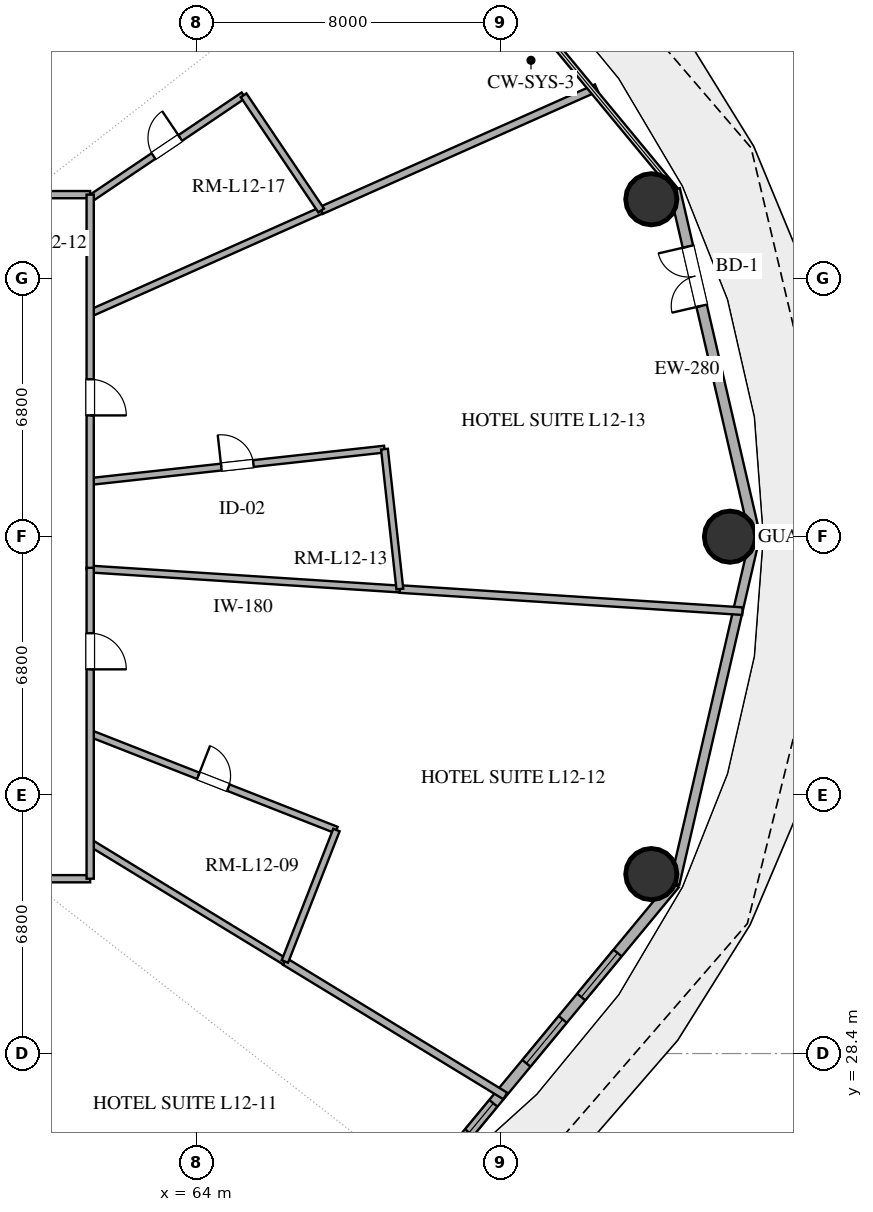
"""IFC4 building model, lengths in metres.
Left out: names, types, materials, properties, quantities, classifications, styles, units other than length and angle.
Written with IfcOpenShell. Run it as: python <this file> out.ifc"""

import sys

from ifc_helpers import new_model, si_unit, direction, frame, frame_2d, origin, origin_2d, place, context, subcontext, project, spatial, rectangle, hollow_circle, extrude, element, fill, save


model = new_model("IFC4")
c1 = context("Model", 3, precision=1e-05, world=origin(), true_north=direction((0.0, 1.0)))
c2 = subcontext(c1, "Body", "Model", "MODEL_VIEW")
j1 = project(units=[si_unit("LENGTHUNIT", "METRE"), si_unit("PLANEANGLEUNIT", "RADIAN")], contexts=[c1])
p1 = place(None, origin())
s1 = spatial("IfcSite", under=j1, at=p1, CompositionType="ELEMENT")
p2 = place(p1, origin())
s2 = spatial("IfcBuilding", under=s1, at=p2, CompositionType="ELEMENT")
p3 = place(p2, frame((0.0, 0.0, 53.4)))
s3 = spatial("IfcBuildingStorey", under=s2, at=p3, CompositionType="ELEMENT", Elevation=53.4)
for number, where, z_axis, x_axis in (
    (1, (78.035, 42.0, 0.0), (0.0, 0.0, 1.0), (1.0, 0.0, 0.0)),
    (2, (75.966, 50.878, 0.0), (0.0, 0.0, 1.0), (1.0, 0.0, 0.0)),
    (3, (75.966, 33.122, 0.0), (0.0, 0.0, 1.0), (1.0, 0.0, 0.0)),
):
    element("IfcColumn", number, at=place(p3, frame(where, z_axis=z_axis, x_axis=x_axis)), inside=s3, PredefinedType="COLUMN", context=c2, shape_type="SweptSolid", body=[
        extrude(hollow_circle(Radius=0.675, WallThickness=0.036, at=origin_2d()), origin(), (0.0, 0.0, 1.0), 3.38),
    ])
p4 = place(p3, frame((78.696, 42.0, 0.0), z_axis=(0.0, 0.0, 1.0), x_axis=(-0.225454452941, 0.974253709076, 0.0)))
e4 = element("IfcWall", 4, at=p4, inside=s3, PredefinedType="SOLIDWALL", context=c2, shape_type="SweptSolid", body=[
    extrude(rectangle(XDim=9.38, YDim=0.28, at=frame_2d((4.69, 0.0))), origin(), (0.0, 0.0, 1.0), 3.38),
])
p5 = place(p4, frame((6.235, 0.0, 0.0)))
e5 = element("IfcOpeningElement", 5, at=p5, cuts=e4, PredefinedType="OPENING", context=c2, shape_type="SweptSolid", body=[
    extrude(rectangle(XDim=1.6, YDim=2.25, at=frame_2d((0.8, 1.125))), frame((0.0, 0.15, 0.0), z_axis=(0.0, -1.0, 0.0), x_axis=(1.0, 0.0, 0.0)), (0.0, 0.0, 1.0), 0.3),
])
p6 = place(p3, frame((70.174, 25.114, 0.0), z_axis=(0.0, 0.0, 1.0), x_axis=(0.637296809613, 0.770618437657, 0.0)))
e6 = element("IfcWall", 6, at=p6, inside=s3, PredefinedType="SOLIDWALL", context=c2, shape_type="SweptSolid", body=[
    extrude(rectangle(XDim=10.053, YDim=0.28, at=frame_2d((5.027, 0.0))), origin(), (0.0, 0.0, 1.0), 3.38),
])
p7 = place(p6, frame((1.565, 0.0, 0.85)))
e7 = element("IfcOpeningElement", 7, at=p7, cuts=e6, PredefinedType="OPENING", context=c2, shape_type="SweptSolid", body=[
    extrude(rectangle(XDim=1.0, YDim=1.8, at=frame_2d((0.5, 0.9))), frame((0.0, 0.15, 0.0), z_axis=(0.0, -1.0, 0.0), x_axis=(1.0, 0.0, 0.0)), (0.0, 0.0, 1.0), 0.3),
])
p8 = place(p6, frame((3.93, 0.0, 0.85)))
e8 = element("IfcOpeningElement", 8, at=p8, cuts=e6, PredefinedType="OPENING", context=c2, shape_type="SweptSolid", body=[
    extrude(rectangle(XDim=1.5, YDim=1.8, at=frame_2d((0.75, 0.9))), frame((0.0, 0.15, 0.0), z_axis=(0.0, -1.0, 0.0), x_axis=(1.0, 0.0, 0.0)), (0.0, 0.0, 1.0), 0.3),
])
p9 = place(p6, frame((6.196, 0.0, 0.85)))
e9 = element("IfcOpeningElement", 9, at=p9, cuts=e6, PredefinedType="OPENING", context=c2, shape_type="SweptSolid", body=[
    extrude(rectangle(XDim=1.5, YDim=1.8, at=frame_2d((0.75, 0.9))), frame((0.0, 0.15, 0.0), z_axis=(0.0, -1.0, 0.0), x_axis=(1.0, 0.0, 0.0)), (0.0, 0.0, 1.0), 0.3),
])
p10 = place(p3, frame((76.581, 32.862, 0.0), z_axis=(0.0, 0.0, 1.0), x_axis=(0.225454452941, 0.974253709076, 0.0)))
e10 = element("IfcWall", 10, at=p10, inside=s3, PredefinedType="SOLIDWALL", context=c2, shape_type="SweptSolid", body=[
    extrude(rectangle(XDim=9.38, YDim=0.25, at=frame_2d((4.69, 0.0))), origin(), (0.0, 0.0, 1.0), 3.38),
])
p11 = place(p3, frame((63.96, 62.204, 0.0), z_axis=(0.0, 0.0, 1.0), x_axis=(-0.619889304847, -0.784689269543, 0.0)))
e11 = element("IfcWall", 11, at=p11, inside=s3, PredefinedType="PARTITIONING", context=c2, shape_type="SweptSolid", body=[
    extrude(rectangle(XDim=14.278, YDim=0.2, at=frame_2d((7.139, 0.0))), origin(), (0.0, 0.0, 1.0), 2.74),
])
p12 = place(p3, frame((78.364, 40.041, 0.0), z_axis=(0.0, 0.0, 1.0), x_axis=(-0.997924020497, 0.064402246198, 0.0)))
e12 = element("IfcWall", 12, at=p12, inside=s3, PredefinedType="PARTITIONING", context=c2, shape_type="SweptSolid", body=[
    extrude(rectangle(XDim=9.034, YDim=0.2, at=frame_2d((4.517, 0.0))), origin(), (0.0, 0.0, 1.0), 2.74),
])
p13 = place(p3, frame((69.349, 40.622, 0.0), z_axis=(0.0, 0.0, 1.0), x_axis=(-0.997924317455, 0.064397644621, 0.0)))
e13 = element("IfcWall", 13, at=p13, inside=s3, PredefinedType="PLUMBINGWALL", context=c2, shape_type="SweptSolid", body=[
    extrude(rectangle(XDim=8.166, YDim=0.18, at=frame_2d((4.083, 0.0))), origin(), (0.0, 0.0, 1.0), 2.74),
])
p14 = place(p3, frame((74.523, 53.809, 0.0), z_axis=(0.0, 0.0, 1.0), x_axis=(-0.913542208968, -0.40674393964, 0.0)))
e14 = element("IfcWall", 14, at=p14, inside=s3, PredefinedType="PARTITIONING", context=c2, shape_type="SweptSolid", body=[
    extrude(rectangle(XDim=7.93, YDim=0.2, at=frame_2d((3.965, 0.0))), origin(), (0.0, 0.0, 1.0), 2.74),
])
p15 = place(p3, frame((61.2, 43.452, 0.0), z_axis=(0.0, 0.0, 1.0), x_axis=(0.994005037085, 0.109334286708, 0.0)))
e15 = element("IfcWall", 15, at=p15, inside=s3, PredefinedType="PLUMBINGWALL", context=c2, shape_type="SweptSolid", body=[
    extrude(rectangle(XDim=7.791, YDim=0.18, at=frame_2d((3.896, 0.0))), origin(), (0.0, 0.0, 1.0), 2.74),
])
p16 = place(p15, frame((3.47, 0.0, 0.0)))
e16 = element("IfcOpeningElement", 16, at=p16, cuts=e15, PredefinedType="OPENING", context=c2, shape_type="SweptSolid", body=[
    extrude(rectangle(XDim=0.85, YDim=2.1, at=frame_2d((0.425, 1.05))), frame((0.0, 0.1, 0.0), z_axis=(0.0, -1.0, 0.0), x_axis=(1.0, 0.0, 0.0)), (0.0, 0.0, 1.0), 0.2),
])
p17 = place(p3, frame((61.01, 20.281, 0.0), z_axis=(0.0, 0.0, 1.0), x_axis=(-0.513892719639, 0.857854458928, 0.0)))
e17 = element("IfcWall", 17, at=p17, inside=s3, PredefinedType="PARTITIONING", context=c2, shape_type="SweptSolid", body=[
    extrude(rectangle(XDim=7.563, YDim=0.2, at=frame_2d((3.781, 0.0))), origin(), (0.0, 0.0, 1.0), 2.74),
])
p18 = place(p3, frame((61.2, 36.823, 0.0), z_axis=(0.0, 0.0, 1.0), x_axis=(0.930954264603, -0.365135806539, 0.0)))
e18 = element("IfcWall", 18, at=p18, inside=s3, PredefinedType="PLUMBINGWALL", context=c2, shape_type="SweptSolid", body=[
    extrude(rectangle(XDim=6.961, YDim=0.18, at=frame_2d((3.48, 0.0))), origin(), (0.0, 0.0, 1.0), 2.74),
])
p19 = place(p18, frame((3.055, 0.0, 0.0)))
e19 = element("IfcOpeningElement", 19, at=p19, cuts=e18, PredefinedType="OPENING", context=c2, shape_type="SweptSolid", body=[
    extrude(rectangle(XDim=0.85, YDim=2.1, at=frame_2d((0.425, 1.05))), frame((0.0, 0.1, 0.0), z_axis=(0.0, -1.0, 0.0), x_axis=(1.0, 0.0, 0.0)), (0.0, 0.0, 1.0), 0.2),
])
p20 = place(p3, frame((72.123, 27.284, 0.0), z_axis=(0.0, 0.0, 1.0), x_axis=(-0.853686673388, 0.520786965735, 0.0)))
e20 = element("IfcWall", 20, at=p20, inside=s3, PredefinedType="PARTITIONING", context=c2, shape_type="SweptSolid", body=[
    extrude(rectangle(XDim=6.793, YDim=0.2, at=frame_2d((3.396, 0.0))), origin(), (0.0, 0.0, 1.0), 2.74),
])
p21 = place(p3, frame((67.278, 50.583, 0.0), z_axis=(0.0, 0.0, 1.0), x_axis=(-0.913551093465, -0.406723984575, 0.0)))
e21 = element("IfcWall", 21, at=p21, inside=s3, PredefinedType="PLUMBINGWALL", context=c2, shape_type="SweptSolid", body=[
    extrude(rectangle(XDim=6.653, YDim=0.18, at=frame_2d((3.327, 0.0))), origin(), (0.0, 0.0, 1.0), 2.74),
])
p22 = place(p3, frame((43.369, 51.0, 0.0), z_axis=(0.0, 0.0, 1.0), x_axis=(1.0, 0.0, 0.0)))
e22 = element("IfcWall", 22, at=p22, inside=s3, PredefinedType="PARTITIONING", context=c2, shape_type="SweptSolid", body=[
    extrude(rectangle(XDim=17.831, YDim=0.19, at=frame_2d((8.916, 0.0))), origin(), (0.0, 0.0, 1.0), 2.74),
])
p23 = place(p22, frame((14.29, 0.0, 0.0)))
e23 = element("IfcOpeningElement", 23, at=p23, cuts=e22, PredefinedType="OPENING", context=c2, shape_type="SweptSolid", body=[
    extrude(rectangle(XDim=0.95, YDim=2.15, at=frame_2d((0.475, 1.075))), frame((0.0, 0.105, 0.0), z_axis=(0.0, -1.0, 0.0), x_axis=(1.0, 0.0, 0.0)), (0.0, 0.0, 1.0), 0.21),
])
p24 = place(p22, frame((8.533, 0.0, 0.0)))
e24 = element("IfcOpeningElement", 24, at=p24, cuts=e22, PredefinedType="OPENING", context=c2, shape_type="SweptSolid", body=[
    extrude(rectangle(XDim=1.0, YDim=2.2, at=frame_2d((0.5, 1.1))), frame((0.0, 0.105, 0.0), z_axis=(0.0, -1.0, 0.0), x_axis=(1.0, 0.0, 0.0)), (0.0, 0.0, 1.0), 0.21),
])
p25 = place(p22, frame((3.591, 0.0, 0.0)))
e25 = element("IfcOpeningElement", 25, at=p25, cuts=e22, PredefinedType="OPENING", context=c2, shape_type="SweptSolid", body=[
    extrude(rectangle(XDim=1.0, YDim=2.2, at=frame_2d((0.5, 1.1))), frame((0.0, 0.105, 0.0), z_axis=(0.0, -1.0, 0.0), x_axis=(1.0, 0.0, 0.0)), (0.0, 0.0, 1.0), 0.21),
])
p26 = place(p3, frame((66.323, 30.822, 0.0), z_axis=(0.0, 0.0, 1.0), x_axis=(-0.853693843866, 0.52077521153, 0.0)))
e26 = element("IfcWall", 26, at=p26, inside=s3, PredefinedType="PLUMBINGWALL", context=c2, shape_type="SweptSolid", body=[
    extrude(rectangle(XDim=6.002, YDim=0.18, at=frame_2d((3.001, 0.0))), origin(), (0.0, 0.0, 1.0), 2.74),
])
p27 = place(p3, frame((61.2, 33.0, 0.0), z_axis=(0.0, 0.0, 1.0), x_axis=(-1.0, 0.0, 0.0)))
e27 = element("IfcWall", 27, at=p27, inside=s3, PredefinedType="PARTITIONING", context=c2, shape_type="SweptSolid", body=[
    extrude(rectangle(XDim=7.846, YDim=0.19, at=frame_2d((3.923, 0.0))), origin(), (0.0, 0.0, 1.0), 2.74),
])
p28 = place(p27, frame((2.249, 0.0, 0.0)))
e28 = element("IfcOpeningElement", 28, at=p28, cuts=e27, PredefinedType="OPENING", context=c2, shape_type="SweptSolid", body=[
    extrude(rectangle(XDim=0.95, YDim=2.15, at=frame_2d((0.475, 1.075))), frame((0.0, 0.105, 0.0), z_axis=(0.0, -1.0, 0.0), x_axis=(1.0, 0.0, 0.0)), (0.0, 0.0, 1.0), 0.21),
])
p29 = place(p3, frame((61.2, 50.893, 0.0), z_axis=(0.0, 0.0, 1.0), x_axis=(0.829362933151, 0.558710233587, 0.0)))
e29 = element("IfcWall", 29, at=p29, inside=s3, PredefinedType="PLUMBINGWALL", context=c2, shape_type="SweptSolid", body=[
    extrude(rectangle(XDim=4.867, YDim=0.18, at=frame_2d((2.434, 0.0))), origin(), (0.0, 0.0, 1.0), 2.74),
])
p30 = place(p29, frame((2.009, 0.0, 0.0)))
e30 = element("IfcOpeningElement", 30, at=p30, cuts=e29, PredefinedType="OPENING", context=c2, shape_type="SweptSolid", body=[
    extrude(rectangle(XDim=0.85, YDim=2.1, at=frame_2d((0.425, 1.05))), frame((0.0, 0.1, 0.0), z_axis=(0.0, -1.0, 0.0), x_axis=(1.0, 0.0, 0.0)), (0.0, 0.0, 1.0), 0.2),
])
p31 = place(p3, frame((61.2, 51.0, 0.0), z_axis=(0.0, 0.0, 1.0), x_axis=(0.0, -1.0, 0.0)))
e31 = element("IfcWall", 31, at=p31, inside=s3, PredefinedType="PARTITIONING", context=c2, shape_type="SweptSolid", body=[
    extrude(rectangle(XDim=9.852, YDim=0.19, at=frame_2d((4.926, 0.0))), origin(), (0.0, 0.0, 1.0), 2.74),
])
p32 = place(p31, frame((4.859, 0.0, 0.0)))
e32 = element("IfcOpeningElement", 32, at=p32, cuts=e31, PredefinedType="OPENING", context=c2, shape_type="SweptSolid", body=[
    extrude(rectangle(XDim=0.95, YDim=2.15, at=frame_2d((0.475, 1.075))), frame((0.0, 0.105, 0.0), z_axis=(0.0, -1.0, 0.0), x_axis=(1.0, 0.0, 0.0)), (0.0, 0.0, 1.0), 0.21),
])
p33 = place(p3, frame((61.2, 41.18, 0.0), z_axis=(0.0, 0.0, 1.0), x_axis=(0.0, -1.0, 0.0)))
e33 = element("IfcWall", 33, at=p33, inside=s3, PredefinedType="PARTITIONING", context=c2, shape_type="SweptSolid", body=[
    extrude(rectangle(XDim=8.18, YDim=0.19, at=frame_2d((4.09, 0.0))), origin(), (0.0, 0.0, 1.0), 2.74),
])
p34 = place(p33, frame((1.721, 0.0, 0.0)))
e34 = element("IfcOpeningElement", 34, at=p34, cuts=e33, PredefinedType="OPENING", context=c2, shape_type="SweptSolid", body=[
    extrude(rectangle(XDim=0.95, YDim=2.15, at=frame_2d((0.475, 1.075))), frame((0.0, 0.105, 0.0), z_axis=(0.0, -1.0, 0.0), x_axis=(1.0, 0.0, 0.0)), (0.0, 0.0, 1.0), 0.21),
])
p35 = place(p3, frame((67.68, 34.281, 0.0), z_axis=(0.0, 0.0, 1.0), x_axis=(-0.365174619735, -0.930939040486, 0.0)))
e35 = element("IfcWall", 35, at=p35, inside=s3, PredefinedType="PLUMBINGWALL", context=c2, shape_type="SweptSolid", body=[
    extrude(rectangle(XDim=3.716, YDim=0.18, at=frame_2d((1.858, 0.0))), origin(), (0.0, 0.0, 1.0), 2.74),
])
p36 = place(p3, frame((68.944, 44.304, 0.0), z_axis=(0.0, 0.0, 1.0), x_axis=(0.109360669908, -0.994002134745, 0.0)))
e36 = element("IfcWall", 36, at=p36, inside=s3, PredefinedType="PLUMBINGWALL", context=c2, shape_type="SweptSolid", body=[
    extrude(rectangle(XDim=3.704, YDim=0.18, at=frame_2d((1.852, 0.0))), origin(), (0.0, 0.0, 1.0), 2.74),
])
p37 = place(p3, frame((65.237, 53.613, 0.0), z_axis=(0.0, 0.0, 1.0), x_axis=(0.558749555988, -0.829336441791, 0.0)))
e37 = element("IfcWall", 37, at=p37, inside=s3, PredefinedType="PLUMBINGWALL", context=c2, shape_type="SweptSolid", body=[
    extrude(rectangle(XDim=3.653, YDim=0.18, at=frame_2d((1.827, 0.0))), origin(), (0.0, 0.0, 1.0), 2.74),
])
p38 = place(p5, origin())
e38 = element("IfcDoor", 38, at=p38, inside=s3, OperationType="DOUBLE_DOOR_SINGLE_SWING", PredefinedType="DOOR", context=c2, shape_type="SweptSolid", body=[
    extrude(rectangle(XDim=1.6, YDim=2.25, at=frame_2d((0.8, 1.125))), frame((0.0, 0.025, 0.0), z_axis=(0.0, -1.0, 0.0), x_axis=(1.0, 0.0, 0.0)), (0.0, 0.0, 1.0), 0.05),
])
fill(e5, e38)
p39 = place(p7, origin())
e39 = element("IfcWindow", 39, at=p39, inside=s3, PartitioningType="SINGLE_PANEL", PredefinedType="WINDOW", context=c2, shape_type="SweptSolid", body=[
    extrude(rectangle(XDim=1.0, YDim=1.8, at=frame_2d((0.5, 0.9))), frame((0.0, 0.03, 0.0), z_axis=(0.0, -1.0, 0.0), x_axis=(1.0, 0.0, 0.0)), (0.0, 0.0, 1.0), 0.06),
])
fill(e7, e39)
p40 = place(p8, origin())
e40 = element("IfcWindow", 40, at=p40, inside=s3, PartitioningType="SINGLE_PANEL", PredefinedType="WINDOW", context=c2, shape_type="SweptSolid", body=[
    extrude(rectangle(XDim=1.5, YDim=1.8, at=frame_2d((0.75, 0.9))), frame((0.0, 0.03, 0.0), z_axis=(0.0, -1.0, 0.0), x_axis=(1.0, 0.0, 0.0)), (0.0, 0.0, 1.0), 0.06),
])
fill(e8, e40)
p41 = place(p9, origin())
e41 = element("IfcWindow", 41, at=p41, inside=s3, PartitioningType="SINGLE_PANEL", PredefinedType="WINDOW", context=c2, shape_type="SweptSolid", body=[
    extrude(rectangle(XDim=1.5, YDim=1.8, at=frame_2d((0.75, 0.9))), frame((0.0, 0.03, 0.0), z_axis=(0.0, -1.0, 0.0), x_axis=(1.0, 0.0, 0.0)), (0.0, 0.0, 1.0), 0.06),
])
fill(e9, e41)
p42 = place(p16, origin())
e42 = element("IfcDoor", 42, at=p42, inside=s3, OperationType="SINGLE_SWING_LEFT", PredefinedType="DOOR", context=c2, shape_type="SweptSolid", body=[
    extrude(rectangle(XDim=0.85, YDim=2.1, at=frame_2d((0.425, 1.05))), frame((0.0, 0.025, 0.0), z_axis=(0.0, -1.0, 0.0), x_axis=(1.0, 0.0, 0.0)), (0.0, 0.0, 1.0), 0.05),
])
fill(e16, e42)
p43 = place(p19, origin())
e43 = element("IfcDoor", 43, at=p43, inside=s3, OperationType="SINGLE_SWING_LEFT", PredefinedType="DOOR", context=c2, shape_type="SweptSolid", body=[
    extrude(rectangle(XDim=0.85, YDim=2.1, at=frame_2d((0.425, 1.05))), frame((0.0, 0.025, 0.0), z_axis=(0.0, -1.0, 0.0), x_axis=(1.0, 0.0, 0.0)), (0.0, 0.0, 1.0), 0.05),
])
fill(e19, e43)
p44 = place(p30, origin())
e44 = element("IfcDoor", 44, at=p44, inside=s3, OperationType="SINGLE_SWING_RIGHT", PredefinedType="DOOR", context=c2, shape_type="SweptSolid", body=[
    extrude(rectangle(XDim=0.85, YDim=2.1, at=frame_2d((0.425, 1.05))), frame((0.0, 0.025, 0.0), z_axis=(0.0, -1.0, 0.0), x_axis=(1.0, 0.0, 0.0)), (0.0, 0.0, 1.0), 0.05),
])
fill(e30, e44)
p45 = place(p32, origin())
e45 = element("IfcDoor", 45, at=p45, inside=s3, OperationType="SINGLE_SWING_RIGHT", PredefinedType="DOOR", context=c2, shape_type="SweptSolid", body=[
    extrude(rectangle(XDim=0.95, YDim=2.15, at=frame_2d((0.475, 1.075))), frame((0.0, 0.025, 0.0), z_axis=(0.0, -1.0, 0.0), x_axis=(1.0, 0.0, 0.0)), (0.0, 0.0, 1.0), 0.05),
])
fill(e32, e45)
p46 = place(p34, origin())
e46 = element("IfcDoor", 46, at=p46, inside=s3, OperationType="SINGLE_SWING_RIGHT", PredefinedType="DOOR", context=c2, shape_type="SweptSolid", body=[
    extrude(rectangle(XDim=0.95, YDim=2.15, at=frame_2d((0.475, 1.075))), frame((0.0, 0.025, 0.0), z_axis=(0.0, -1.0, 0.0), x_axis=(1.0, 0.0, 0.0)), (0.0, 0.0, 1.0), 0.05),
])
fill(e34, e46)
save(model, sys.argv[1])
